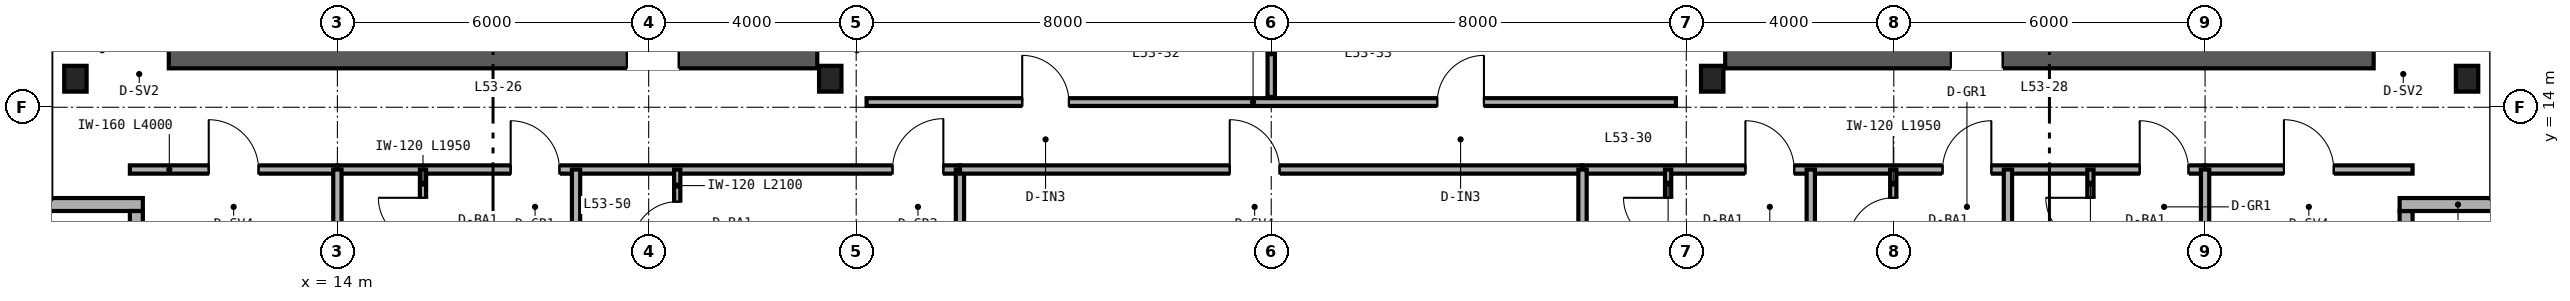
"""IFC4 building model, lengths in metres.
Left out: names, types, materials, properties, quantities, classifications, styles, units other than length and angle.
Written with IfcOpenShell. Run it as: python <this file> out.ifc"""

import sys

from ifc_helpers import new_model, si_unit, direction, frame, frame_2d, origin, origin_2d, place, context, subcontext, project, spatial, rectangle, i_section, extrude, source, transform, mapped, element, fill, save


model = new_model("IFC4")
c1 = context("Model", 3, precision=1e-05, world=origin(), true_north=direction((0.0, 1.0)))
c2 = subcontext(c1, "Body", "Model", "MODEL_VIEW")
j1 = project(units=[si_unit("LENGTHUNIT", "METRE"), si_unit("PLANEANGLEUNIT", "RADIAN")], contexts=[c1])
p1 = place(None, origin())
s1 = spatial("IfcSite", under=j1, at=p1, CompositionType="ELEMENT")
p2 = place(p1, origin())
s2 = spatial("IfcBuilding", under=s1, at=p2, CompositionType="ELEMENT")
p3 = place(p2, frame((0.0, 0.0, 210.0)))
s3 = spatial("IfcBuildingStorey", under=s2, at=p3, CompositionType="ELEMENT", Elevation=210.0)
p4 = place(p3, frame((10.75, 15.0, 0.0), z_axis=(0.0, 0.0, 1.0), x_axis=(1.0, 0.0, 0.0)))
e1 = element("IfcWall", 1, at=p4, inside=s3, PredefinedType="SHEAR", context=c2, shape_type="SweptSolid", body=[
    extrude(rectangle(XDim=12.5, YDim=0.5, at=frame_2d((6.25, 0.0))), origin(), (0.0, 0.0, 1.0), 3.37),
])
p5 = place(p4, frame((8.83, 0.0, 0.0)))
e2 = element("IfcOpeningElement", 2, at=p5, cuts=e1, PredefinedType="OPENING", context=c2, shape_type="SweptSolid", body=[
    extrude(rectangle(XDim=1.0, YDim=2.15, at=frame_2d((0.5, 1.075))), frame((0.0, 0.26, 0.0), z_axis=(0.0, -1.0, 0.0), x_axis=(1.0, 0.0, 0.0)), (0.0, 0.0, 1.0), 0.52),
])
p6 = place(p3, frame((40.75, 15.0, 0.0), z_axis=(0.0, 0.0, 1.0), x_axis=(1.0, 0.0, 0.0)))
e3 = element("IfcWall", 3, at=p6, inside=s3, PredefinedType="SHEAR", context=c2, shape_type="SweptSolid", body=[
    extrude(rectangle(XDim=12.5, YDim=0.5, at=frame_2d((6.25, 0.0))), origin(), (0.0, 0.0, 1.0), 3.37),
])
p7 = place(p6, frame((4.35, 0.0, 0.0)))
e4 = element("IfcOpeningElement", 4, at=p7, cuts=e3, PredefinedType="OPENING", context=c2, shape_type="SweptSolid", body=[
    extrude(rectangle(XDim=1.0, YDim=2.15, at=frame_2d((0.5, 1.075))), frame((0.0, 0.26, 0.0), z_axis=(0.0, -1.0, 0.0), x_axis=(1.0, 0.0, 0.0)), (0.0, 0.0, 1.0), 0.52),
])
m1 = source(origin(), c2, "Body", "SweptSolid", [
    extrude(i_section(OverallWidth=0.432, OverallDepth=0.498, WebThickness=0.056, FlangeThickness=0.089, FilletRadius=0.025, at=origin_2d()), origin(), (0.0, 0.0, 1.0), 3.37),
])
for number, where, z_axis, x_axis in (
    (5, (8.95, 14.55, 0.0), (0.0, 0.0, 1.0), (1.0, 0.0, 0.0)),
    (6, (23.5, 14.55, 0.0), (0.0, 0.0, 1.0), (1.0, 0.0, 0.0)),
    (7, (40.5, 14.55, 0.0), (0.0, 0.0, 1.0), (1.0, 0.0, 0.0)),
    (8, (55.05, 14.55, 0.0), (0.0, 0.0, 1.0), (1.0, 0.0, 0.0)),
):
    element("IfcColumn", number, at=place(p3, frame(where, z_axis=z_axis, x_axis=x_axis)), inside=s3, PredefinedType="COLUMN", context=c2, shape_type="MappedRepresentation", body=[
        mapped(m1, transform((0.0, 0.0, 0.0), scale=1.0)),
    ])
p8 = place(p3, frame((53.875, 10.0, 0.0), z_axis=(0.0, 0.0, 1.0), x_axis=(0.0, 1.0, 0.0)))
e9 = element("IfcWall", 9, at=p8, inside=s3, PredefinedType="SOLIDWALL", context=c2, shape_type="SweptSolid", body=[
    extrude(rectangle(XDim=2.0, YDim=0.25, at=frame_2d((1.0, 0.0))), origin(), (0.0, 0.0, 1.0), 3.37),
])
for number, where, z_axis, x_axis in (
    (10, (53.75, 12.125, 0.0), (0.0, 0.0, 1.0), (1.0, 0.0, 0.0)),
    (11, (8.0, 12.125, 0.0), (0.0, 0.0, 1.0), (1.0, 0.0, 0.0)),
):
    element("IfcWall", number, at=place(p3, frame(where, z_axis=z_axis, x_axis=x_axis)), inside=s3, PredefinedType="SOLIDWALL", context=c2, shape_type="SweptSolid", body=[
        extrude(rectangle(XDim=2.25, YDim=0.25, at=frame_2d((1.125, 0.0))), origin(), (0.0, 0.0, 1.0), 3.37),
    ])
p9 = place(p3, frame((10.125, 12.0, 0.0), z_axis=(0.0, 0.0, 1.0), x_axis=(0.0, -1.0, 0.0)))
e12 = element("IfcWall", 12, at=p9, inside=s3, PredefinedType="SOLIDWALL", context=c2, shape_type="SweptSolid", body=[
    extrude(rectangle(XDim=2.0, YDim=0.25, at=frame_2d((1.0, 0.0))), origin(), (0.0, 0.0, 1.0), 3.37),
])
p10 = place(p3, frame((24.2, 14.1, 0.0), z_axis=(0.0, 0.0, 1.0), x_axis=(1.0, 0.0, 0.0)))
e13 = element("IfcWall", 13, at=p10, inside=s3, PredefinedType="PARTITIONING", context=c2, shape_type="SweptSolid", body=[
    extrude(rectangle(XDim=15.6, YDim=0.15, at=frame_2d((7.8, 0.0))), origin(), (0.0, 0.0, 1.0), 3.37),
])
p11 = place(p10, frame((3.0, 0.0, 0.0)))
e14 = element("IfcOpeningElement", 14, at=p11, cuts=e13, PredefinedType="OPENING", context=c2, shape_type="SweptSolid", body=[
    extrude(rectangle(XDim=0.9, YDim=2.15, at=frame_2d((0.45, 1.075))), frame((0.0, 0.085, 0.0), z_axis=(0.0, -1.0, 0.0), x_axis=(1.0, 0.0, 0.0)), (0.0, 0.0, 1.0), 0.17),
])
p12 = place(p10, frame((11.0, 0.0, 0.0)))
e15 = element("IfcOpeningElement", 15, at=p12, cuts=e13, PredefinedType="OPENING", context=c2, shape_type="SweptSolid", body=[
    extrude(rectangle(XDim=0.9, YDim=2.15, at=frame_2d((0.45, 1.075))), frame((0.0, 0.085, 0.0), z_axis=(0.0, -1.0, 0.0), x_axis=(1.0, 0.0, 0.0)), (0.0, 0.0, 1.0), 0.17),
])
p13 = place(p3, frame((32.0, 14.2, 0.0), z_axis=(0.0, 0.0, 1.0), x_axis=(0.0, 1.0, 0.0)))
e16 = element("IfcWall", 16, at=p13, inside=s3, PredefinedType="PARTITIONING", context=c2, shape_type="SweptSolid", body=[
    extrude(rectangle(XDim=1.68, YDim=0.142, at=frame_2d((0.84, 0.0))), origin(), (0.0, 0.0, 1.0), 3.37),
])
p14 = place(p3, frame((10.0, 12.8, 0.0), z_axis=(0.0, 0.0, 1.0), x_axis=(1.0, 0.0, 0.0)))
e17 = element("IfcWall", 17, at=p14, inside=s3, PredefinedType="PARTITIONING", context=c2, shape_type="SweptSolid", body=[
    extrude(rectangle(XDim=4.0, YDim=0.16, at=frame_2d((2.0, 0.0))), origin(), (0.0, 0.0, 1.0), 3.37),
])
p15 = place(p14, frame((1.52, 0.0, 0.0)))
e18 = element("IfcOpeningElement", 18, at=p15, cuts=e17, PredefinedType="OPENING", context=c2, shape_type="SweptSolid", body=[
    extrude(rectangle(XDim=0.96, YDim=2.15, at=frame_2d((0.48, 1.075))), frame((0.0, 0.09, 0.0), z_axis=(0.0, -1.0, 0.0), x_axis=(1.0, 0.0, 0.0)), (0.0, 0.0, 1.0), 0.18),
])
p16 = place(p3, frame((50.0, 12.8, 0.0), z_axis=(0.0, 0.0, 1.0), x_axis=(1.0, 0.0, 0.0)))
e19 = element("IfcWall", 19, at=p16, inside=s3, PredefinedType="PARTITIONING", context=c2, shape_type="SweptSolid", body=[
    extrude(rectangle(XDim=4.0, YDim=0.16, at=frame_2d((2.0, 0.0))), origin(), (0.0, 0.0, 1.0), 3.37),
])
p17 = place(p16, frame((1.52, 0.0, 0.0)))
e20 = element("IfcOpeningElement", 20, at=p17, cuts=e19, PredefinedType="OPENING", context=c2, shape_type="SweptSolid", body=[
    extrude(rectangle(XDim=0.96, YDim=2.15, at=frame_2d((0.48, 1.075))), frame((0.0, 0.09, 0.0), z_axis=(0.0, -1.0, 0.0), x_axis=(1.0, 0.0, 0.0)), (0.0, 0.0, 1.0), 0.18),
])
p18 = place(p3, frame((14.0, 12.8, 0.0), z_axis=(0.0, 0.0, 1.0), x_axis=(1.0, 0.0, 0.0)))
e21 = element("IfcWall", 21, at=p18, inside=s3, PredefinedType="PARTITIONING", context=c2, shape_type="SweptSolid", body=[
    extrude(rectangle(XDim=12.0, YDim=0.16, at=frame_2d((6.0, 0.0))), origin(), (0.0, 0.0, 1.0), 2.913),
])
p19 = place(p18, frame((3.34, 0.0, 0.0)))
e22 = element("IfcOpeningElement", 22, at=p19, cuts=e21, PredefinedType="OPENING", context=c2, shape_type="SweptSolid", body=[
    extrude(rectangle(XDim=0.94, YDim=2.15, at=frame_2d((0.47, 1.075))), frame((0.0, 0.09, 0.0), z_axis=(0.0, -1.0, 0.0), x_axis=(1.0, 0.0, 0.0)), (0.0, 0.0, 1.0), 0.18),
])
p20 = place(p18, frame((10.7, 0.0, 0.0)))
e23 = element("IfcOpeningElement", 23, at=p20, cuts=e21, PredefinedType="OPENING", context=c2, shape_type="SweptSolid", body=[
    extrude(rectangle(XDim=0.98, YDim=2.2, at=frame_2d((0.49, 1.1))), frame((0.0, 0.09, 0.0), z_axis=(0.0, -1.0, 0.0), x_axis=(1.0, 0.0, 0.0)), (0.0, 0.0, 1.0), 0.18),
])
p21 = place(p3, frame((14.0, 6.36, 0.0), z_axis=(0.0, 0.0, 1.0), x_axis=(0.0, 1.0, 0.0)))
e24 = element("IfcWall", 24, at=p21, inside=s3, PredefinedType="PARTITIONING", context=c2, shape_type="SweptSolid", body=[
    extrude(rectangle(XDim=6.44, YDim=0.16, at=frame_2d((3.22, 0.0))), origin(), (0.0, 0.0, 1.0), 2.677),
])
p22 = place(p3, frame((26.0, 6.36, 0.0), z_axis=(0.0, 0.0, 1.0), x_axis=(0.0, 1.0, 0.0)))
e25 = element("IfcWall", 25, at=p22, inside=s3, PredefinedType="PARTITIONING", context=c2, shape_type="SweptSolid", body=[
    extrude(rectangle(XDim=6.44, YDim=0.16, at=frame_2d((3.22, 0.0))), origin(), (0.0, 0.0, 1.0), 2.443),
])
p23 = place(p3, frame((18.6, 6.36, 0.0), z_axis=(0.0, 0.0, 1.0), x_axis=(0.0, 1.0, 0.0)))
e26 = element("IfcWall", 26, at=p23, inside=s3, PredefinedType="PARTITIONING", context=c2, shape_type="SweptSolid", body=[
    extrude(rectangle(XDim=6.44, YDim=0.16, at=frame_2d((3.22, 0.0))), origin(), (0.0, 0.0, 1.0), 2.677),
])
p24 = place(p3, frame((15.65, 10.85, 0.0), z_axis=(0.0, 0.0, 1.0), x_axis=(0.0, 1.0, 0.0)))
e27 = element("IfcWall", 27, at=p24, inside=s3, PredefinedType="PARTITIONING", context=c2, shape_type="SweptSolid", body=[
    extrude(rectangle(XDim=1.95, YDim=0.12, at=frame_2d((0.975, 0.0))), origin(), (0.0, 0.0, 1.0), 3.37),
])
p25 = place(p24, frame((0.545, 0.0, 0.0)))
e28 = element("IfcOpeningElement", 28, at=p25, cuts=e27, PredefinedType="OPENING", context=c2, shape_type="SweptSolid", body=[
    extrude(rectangle(XDim=0.86, YDim=2.1, at=frame_2d((0.43, 1.05))), frame((0.0, 0.07, 0.0), z_axis=(0.0, -1.0, 0.0), x_axis=(1.0, 0.0, 0.0)), (0.0, 0.0, 1.0), 0.14),
])
p26 = place(p3, frame((20.55, 10.7, 0.0), z_axis=(0.0, 0.0, 1.0), x_axis=(0.0, 1.0, 0.0)))
e29 = element("IfcWall", 29, at=p26, inside=s3, PredefinedType="PARTITIONING", context=c2, shape_type="SweptSolid", body=[
    extrude(rectangle(XDim=2.1, YDim=0.12, at=frame_2d((1.05, 0.0))), origin(), (0.0, 0.0, 1.0), 3.37),
])
p27 = place(p26, frame((0.62, 0.0, 0.0)))
e30 = element("IfcOpeningElement", 30, at=p27, cuts=e29, PredefinedType="OPENING", context=c2, shape_type="SweptSolid", body=[
    extrude(rectangle(XDim=0.86, YDim=2.1, at=frame_2d((0.43, 1.05))), frame((0.0, 0.07, 0.0), z_axis=(0.0, -1.0, 0.0), x_axis=(1.0, 0.0, 0.0)), (0.0, 0.0, 1.0), 0.14),
])
p28 = place(p3, frame((26.0, 12.8, 0.0), z_axis=(0.0, 0.0, 1.0), x_axis=(1.0, 0.0, 0.0)))
e31 = element("IfcWall", 31, at=p28, inside=s3, PredefinedType="PARTITIONING", context=c2, shape_type="SweptSolid", body=[
    extrude(rectangle(XDim=12.0, YDim=0.16, at=frame_2d((6.0, 0.0))), origin(), (0.0, 0.0, 1.0), 3.37),
])
p29 = place(p28, frame((5.2, 0.0, 0.0)))
e32 = element("IfcOpeningElement", 32, at=p29, cuts=e31, PredefinedType="OPENING", context=c2, shape_type="SweptSolid", body=[
    extrude(rectangle(XDim=0.96, YDim=2.15, at=frame_2d((0.48, 1.075))), frame((0.0, 0.09, 0.0), z_axis=(0.0, -1.0, 0.0), x_axis=(1.0, 0.0, 0.0)), (0.0, 0.0, 1.0), 0.18),
])
p30 = place(p3, frame((38.0, 12.8, 0.0), z_axis=(0.0, 0.0, 1.0), x_axis=(1.0, 0.0, 0.0)))
e33 = element("IfcWall", 33, at=p30, inside=s3, PredefinedType="PARTITIONING", context=c2, shape_type="SweptSolid", body=[
    extrude(rectangle(XDim=12.0, YDim=0.16, at=frame_2d((6.0, 0.0))), origin(), (0.0, 0.0, 1.0), 2.913),
])
p31 = place(p30, frame((3.14, 0.0, 0.0)))
e34 = element("IfcOpeningElement", 34, at=p31, cuts=e33, PredefinedType="OPENING", context=c2, shape_type="SweptSolid", body=[
    extrude(rectangle(XDim=0.94, YDim=2.15, at=frame_2d((0.47, 1.075))), frame((0.0, 0.09, 0.0), z_axis=(0.0, -1.0, 0.0), x_axis=(1.0, 0.0, 0.0)), (0.0, 0.0, 1.0), 0.18),
])
p32 = place(p30, frame((6.94, 0.0, 0.0)))
e35 = element("IfcOpeningElement", 35, at=p32, cuts=e33, PredefinedType="OPENING", context=c2, shape_type="SweptSolid", body=[
    extrude(rectangle(XDim=0.94, YDim=2.15, at=frame_2d((0.47, 1.075))), frame((0.0, 0.09, 0.0), z_axis=(0.0, -1.0, 0.0), x_axis=(1.0, 0.0, 0.0)), (0.0, 0.0, 1.0), 0.18),
])
p33 = place(p30, frame((10.74, 0.0, 0.0)))
e36 = element("IfcOpeningElement", 36, at=p33, cuts=e33, PredefinedType="OPENING", context=c2, shape_type="SweptSolid", body=[
    extrude(rectangle(XDim=0.94, YDim=2.15, at=frame_2d((0.47, 1.075))), frame((0.0, 0.09, 0.0), z_axis=(0.0, -1.0, 0.0), x_axis=(1.0, 0.0, 0.0)), (0.0, 0.0, 1.0), 0.18),
])
p34 = place(p3, frame((38.0, 6.36, 0.0), z_axis=(0.0, 0.0, 1.0), x_axis=(0.0, 1.0, 0.0)))
e37 = element("IfcWall", 37, at=p34, inside=s3, PredefinedType="PARTITIONING", context=c2, shape_type="SweptSolid", body=[
    extrude(rectangle(XDim=6.44, YDim=0.16, at=frame_2d((3.22, 0.0))), origin(), (0.0, 0.0, 1.0), 2.443),
])
p35 = place(p3, frame((50.0, 6.36, 0.0), z_axis=(0.0, 0.0, 1.0), x_axis=(0.0, 1.0, 0.0)))
e38 = element("IfcWall", 38, at=p35, inside=s3, PredefinedType="PARTITIONING", context=c2, shape_type="SweptSolid", body=[
    extrude(rectangle(XDim=6.44, YDim=0.16, at=frame_2d((3.22, 0.0))), origin(), (0.0, 0.0, 1.0), 2.677),
])
p36 = place(p3, frame((42.4, 6.36, 0.0), z_axis=(0.0, 0.0, 1.0), x_axis=(0.0, 1.0, 0.0)))
e39 = element("IfcWall", 39, at=p36, inside=s3, PredefinedType="PARTITIONING", context=c2, shape_type="SweptSolid", body=[
    extrude(rectangle(XDim=6.44, YDim=0.16, at=frame_2d((3.22, 0.0))), origin(), (0.0, 0.0, 1.0), 2.833),
])
p37 = place(p3, frame((39.65, 10.85, 0.0), z_axis=(0.0, 0.0, 1.0), x_axis=(0.0, 1.0, 0.0)))
e40 = element("IfcWall", 40, at=p37, inside=s3, PredefinedType="PARTITIONING", context=c2, shape_type="SweptSolid", body=[
    extrude(rectangle(XDim=1.95, YDim=0.12, at=frame_2d((0.975, 0.0))), origin(), (0.0, 0.0, 1.0), 3.37),
])
p38 = place(p37, frame((0.545, 0.0, 0.0)))
e41 = element("IfcOpeningElement", 41, at=p38, cuts=e40, PredefinedType="OPENING", context=c2, shape_type="SweptSolid", body=[
    extrude(rectangle(XDim=0.86, YDim=2.1, at=frame_2d((0.43, 1.05))), frame((0.0, 0.07, 0.0), z_axis=(0.0, -1.0, 0.0), x_axis=(1.0, 0.0, 0.0)), (0.0, 0.0, 1.0), 0.14),
])
p39 = place(p3, frame((46.2, 6.36, 0.0), z_axis=(0.0, 0.0, 1.0), x_axis=(0.0, 1.0, 0.0)))
e42 = element("IfcWall", 42, at=p39, inside=s3, PredefinedType="PARTITIONING", context=c2, shape_type="SweptSolid", body=[
    extrude(rectangle(XDim=6.44, YDim=0.16, at=frame_2d((3.22, 0.0))), origin(), (0.0, 0.0, 1.0), 2.677),
])
p40 = place(p3, frame((43.99, 10.85, 0.0), z_axis=(0.0, 0.0, 1.0), x_axis=(0.0, 1.0, 0.0)))
e43 = element("IfcWall", 43, at=p40, inside=s3, PredefinedType="PARTITIONING", context=c2, shape_type="SweptSolid", body=[
    extrude(rectangle(XDim=1.95, YDim=0.12, at=frame_2d((0.975, 0.0))), origin(), (0.0, 0.0, 1.0), 3.37),
])
p41 = place(p40, frame((0.545, 0.0, 0.0)))
e44 = element("IfcOpeningElement", 44, at=p41, cuts=e43, PredefinedType="OPENING", context=c2, shape_type="SweptSolid", body=[
    extrude(rectangle(XDim=0.86, YDim=2.1, at=frame_2d((0.43, 1.05))), frame((0.0, 0.07, 0.0), z_axis=(0.0, -1.0, 0.0), x_axis=(1.0, 0.0, 0.0)), (0.0, 0.0, 1.0), 0.14),
])
p42 = place(p3, frame((47.79, 10.85, 0.0), z_axis=(0.0, 0.0, 1.0), x_axis=(0.0, 1.0, 0.0)))
e45 = element("IfcWall", 45, at=p42, inside=s3, PredefinedType="PARTITIONING", context=c2, shape_type="SweptSolid", body=[
    extrude(rectangle(XDim=1.95, YDim=0.12, at=frame_2d((0.975, 0.0))), origin(), (0.0, 0.0, 1.0), 3.37),
])
p43 = place(p42, frame((0.545, 0.0, 0.0)))
e46 = element("IfcOpeningElement", 46, at=p43, cuts=e45, PredefinedType="OPENING", context=c2, shape_type="SweptSolid", body=[
    extrude(rectangle(XDim=0.86, YDim=2.1, at=frame_2d((0.43, 1.05))), frame((0.0, 0.07, 0.0), z_axis=(0.0, -1.0, 0.0), x_axis=(1.0, 0.0, 0.0)), (0.0, 0.0, 1.0), 0.14),
])
m2 = source(origin(), c2, "Body", "SweptSolid", [
    extrude(rectangle(XDim=1.0, YDim=2.15, at=frame_2d((0.5, 1.075))), frame((0.0, 0.025, 0.0), z_axis=(0.0, -1.0, 0.0), x_axis=(1.0, 0.0, 0.0)), (0.0, 0.0, 1.0), 0.05),
])
p44 = place(p5, origin())
e47 = element("IfcDoor", 47, at=p44, inside=s3, OperationType="SINGLE_SWING_LEFT", PredefinedType="DOOR", context=c2, shape_type="MappedRepresentation", body=[
    mapped(m2, transform((0.0, 0.0, 0.0), scale=1.0)),
])
fill(e2, e47)
p45 = place(p7, origin())
e48 = element("IfcDoor", 48, at=p45, inside=s3, OperationType="SINGLE_SWING_RIGHT", PredefinedType="DOOR", context=c2, shape_type="MappedRepresentation", body=[
    mapped(m2, transform((0.0, 0.0, 0.0), scale=1.0)),
])
fill(e4, e48)
m3 = source(origin(), c2, "Body", "SweptSolid", [
    extrude(rectangle(XDim=0.9, YDim=2.15, at=frame_2d((0.45, 1.075))), frame((0.0, 0.025, 0.0), z_axis=(0.0, -1.0, 0.0), x_axis=(1.0, 0.0, 0.0)), (0.0, 0.0, 1.0), 0.05),
])
p46 = place(p11, origin())
e49 = element("IfcDoor", 49, at=p46, inside=s3, OperationType="SINGLE_SWING_LEFT", PredefinedType="DOOR", context=c2, shape_type="MappedRepresentation", body=[
    mapped(m3, transform((0.0, 0.0, 0.0), scale=1.0)),
])
fill(e14, e49)
p47 = place(p12, origin())
e50 = element("IfcDoor", 50, at=p47, inside=s3, OperationType="SINGLE_SWING_RIGHT", PredefinedType="DOOR", context=c2, shape_type="MappedRepresentation", body=[
    mapped(m3, transform((0.0, 0.0, 0.0), scale=1.0)),
])
fill(e15, e50)
m4 = source(origin(), c2, "Body", "SweptSolid", [
    extrude(rectangle(XDim=0.96, YDim=2.15, at=frame_2d((0.48, 1.075))), frame((0.0, 0.025, 0.0), z_axis=(0.0, -1.0, 0.0), x_axis=(1.0, 0.0, 0.0)), (0.0, 0.0, 1.0), 0.05),
])
p48 = place(p15, origin())
e51 = element("IfcDoor", 51, at=p48, inside=s3, OperationType="SINGLE_SWING_LEFT", PredefinedType="DOOR", context=c2, shape_type="MappedRepresentation", body=[
    mapped(m4, transform((0.0, 0.0, 0.0), scale=1.0)),
])
fill(e18, e51)
p49 = place(p17, origin())
e52 = element("IfcDoor", 52, at=p49, inside=s3, OperationType="SINGLE_SWING_LEFT", PredefinedType="DOOR", context=c2, shape_type="MappedRepresentation", body=[
    mapped(m4, transform((0.0, 0.0, 0.0), scale=1.0)),
])
fill(e20, e52)
m5 = source(origin(), c2, "Body", "SweptSolid", [
    extrude(rectangle(XDim=0.86, YDim=2.1, at=frame_2d((0.43, 1.05))), frame((0.0, 0.025, 0.0), z_axis=(0.0, -1.0, 0.0), x_axis=(1.0, 0.0, 0.0)), (0.0, 0.0, 1.0), 0.05),
])
p50 = place(p25, origin())
e53 = element("IfcDoor", 53, at=p50, inside=s3, OperationType="SINGLE_SWING_RIGHT", PredefinedType="DOOR", context=c2, shape_type="MappedRepresentation", body=[
    mapped(m5, transform((0.0, 0.0, 0.0), scale=1.0)),
])
fill(e28, e53)
p51 = place(p27, origin())
e54 = element("IfcDoor", 54, at=p51, inside=s3, OperationType="SINGLE_SWING_LEFT", PredefinedType="DOOR", context=c2, shape_type="MappedRepresentation", body=[
    mapped(m5, transform((0.0, 0.0, 0.0), scale=1.0)),
])
fill(e30, e54)
m6 = source(origin(), c2, "Body", "SweptSolid", [
    extrude(rectangle(XDim=0.94, YDim=2.15, at=frame_2d((0.47, 1.075))), frame((0.0, 0.025, 0.0), z_axis=(0.0, -1.0, 0.0), x_axis=(1.0, 0.0, 0.0)), (0.0, 0.0, 1.0), 0.05),
])
p52 = place(p19, origin())
e55 = element("IfcDoor", 55, at=p52, inside=s3, OperationType="SINGLE_SWING_LEFT", PredefinedType="DOOR", context=c2, shape_type="MappedRepresentation", body=[
    mapped(m6, transform((0.0, 0.0, 0.0), scale=1.0)),
])
fill(e22, e55)
m7 = source(origin(), c2, "Body", "SweptSolid", [
    extrude(rectangle(XDim=0.98, YDim=2.2, at=frame_2d((0.49, 1.1))), frame((0.0, 0.025, 0.0), z_axis=(0.0, -1.0, 0.0), x_axis=(1.0, 0.0, 0.0)), (0.0, 0.0, 1.0), 0.05),
])
p53 = place(p20, origin())
e56 = element("IfcDoor", 56, at=p53, inside=s3, OperationType="SINGLE_SWING_RIGHT", PredefinedType="DOOR", context=c2, shape_type="MappedRepresentation", body=[
    mapped(m7, transform((0.0, 0.0, 0.0), scale=1.0)),
])
fill(e23, e56)
p54 = place(p29, origin())
e57 = element("IfcDoor", 57, at=p54, inside=s3, OperationType="SINGLE_SWING_LEFT", PredefinedType="DOOR", context=c2, shape_type="MappedRepresentation", body=[
    mapped(m4, transform((0.0, 0.0, 0.0), scale=1.0)),
])
fill(e32, e57)
p55 = place(p38, origin())
e58 = element("IfcDoor", 58, at=p55, inside=s3, OperationType="SINGLE_SWING_RIGHT", PredefinedType="DOOR", context=c2, shape_type="MappedRepresentation", body=[
    mapped(m5, transform((0.0, 0.0, 0.0), scale=1.0)),
])
fill(e41, e58)
p56 = place(p41, origin())
e59 = element("IfcDoor", 59, at=p56, inside=s3, OperationType="SINGLE_SWING_LEFT", PredefinedType="DOOR", context=c2, shape_type="MappedRepresentation", body=[
    mapped(m5, transform((0.0, 0.0, 0.0), scale=1.0)),
])
fill(e44, e59)
p57 = place(p43, origin())
e60 = element("IfcDoor", 60, at=p57, inside=s3, OperationType="SINGLE_SWING_RIGHT", PredefinedType="DOOR", context=c2, shape_type="MappedRepresentation", body=[
    mapped(m5, transform((0.0, 0.0, 0.0), scale=1.0)),
])
fill(e46, e60)
p58 = place(p31, origin())
e61 = element("IfcDoor", 61, at=p58, inside=s3, OperationType="SINGLE_SWING_LEFT", PredefinedType="DOOR", context=c2, shape_type="MappedRepresentation", body=[
    mapped(m6, transform((0.0, 0.0, 0.0), scale=1.0)),
])
fill(e34, e61)
p59 = place(p32, origin())
e62 = element("IfcDoor", 62, at=p59, inside=s3, OperationType="SINGLE_SWING_RIGHT", PredefinedType="DOOR", context=c2, shape_type="MappedRepresentation", body=[
    mapped(m6, transform((0.0, 0.0, 0.0), scale=1.0)),
])
fill(e35, e62)
p60 = place(p33, origin())
e63 = element("IfcDoor", 63, at=p60, inside=s3, OperationType="SINGLE_SWING_LEFT", PredefinedType="DOOR", context=c2, shape_type="MappedRepresentation", body=[
    mapped(m6, transform((0.0, 0.0, 0.0), scale=1.0)),
])
fill(e36, e63)
save(model, sys.argv[1])
